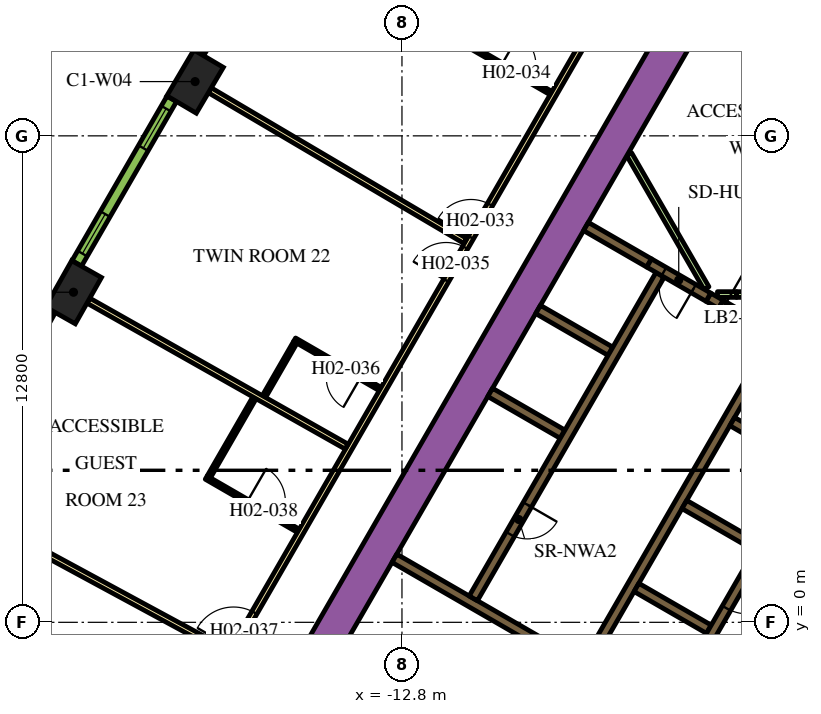
"""IFC4 building model, lengths in metres.
Left out: names, types, materials, properties, quantities, classifications, styles, units other than length and angle.
Written with IfcOpenShell. Run it as: python <this file> out.ifc"""

import sys

from ifc_helpers import new_model, si_unit, direction, frame, frame_2d, origin, origin_2d, place, context, subcontext, project, spatial, rectangle, extrude, element, fill, save


model = new_model("IFC4")
c1 = context("Model", 3, precision=1e-05, world=origin(), true_north=direction((0.0, 1.0)))
c2 = subcontext(c1, "Body", "Model", "MODEL_VIEW")
j1 = project(units=[si_unit("LENGTHUNIT", "METRE"), si_unit("PLANEANGLEUNIT", "RADIAN")], contexts=[c1])
p1 = place(None, origin())
s1 = spatial("IfcSite", under=j1, at=p1, CompositionType="ELEMENT")
p2 = place(p1, origin())
s2 = spatial("IfcBuilding", under=s1, at=p2, CompositionType="ELEMENT")
p3 = place(p2, frame((0.0, 0.0, 43.2)))
s3 = spatial("IfcBuildingStorey", under=s2, at=p3, CompositionType="ELEMENT", Elevation=43.2)
for number, where, z_axis, x_axis in (
    (1, (-18.243, 14.228, 0.0), (0.0, 0.0, 1.0), (-0.508, -0.861, 0.0)),
    (2, (-21.443, 8.685, 0.0), (0.0, 0.0, 1.0), (-0.492, -0.871, 0.0)),
):
    element("IfcColumn", number, at=place(p3, frame(where, z_axis=z_axis, x_axis=x_axis)), inside=s3, PredefinedType="COLUMN", context=c2, shape_type="SweptSolid", body=[
        extrude(rectangle(XDim=1.4, YDim=0.9, at=origin_2d()), origin(), (0.0, 0.0, 1.0), 3.9),
    ])
p4 = place(p3, frame((-15.36, -1.503, 0.0), z_axis=(0.0, 0.0, 1.0), x_axis=(0.50000389221, 0.866023156604, 0.0)))
e3 = element("IfcWall", 3, at=p4, inside=s3, PredefinedType="SOLIDWALL", context=c2, shape_type="SweptSolid", body=[
    extrude(rectangle(XDim=21.0, YDim=0.9, at=frame_2d((10.5, 0.0))), origin(), (0.0, 0.0, 1.0), 3.9),
])
p5 = place(p3, frame((-8.06, -1.311, 0.0), z_axis=(0.0, 0.0, 1.0), x_axis=(0.50000273126, 0.866023826885, 0.0)))
e4 = element("IfcWall", 4, at=p5, inside=s3, PredefinedType="SOLIDWALL", context=c2, shape_type="SweptSolid", body=[
    extrude(rectangle(XDim=10.33, YDim=0.25, at=frame_2d((5.165, 0.0))), origin(), (0.0, 0.0, 1.0), 3.9),
])
for number, where, z_axis, x_axis in (
    (5, (-2.204, 4.182, 0.0), (0.0, 0.0, 1.0), (-0.866, 0.5, 0.0)),
    (6, (-5.369, 3.1, 0.0), (0.0, 0.0, 1.0), (0.866, -0.5, 0.0)),
    (7, (-4.724, -0.182, 0.0), (0.0, 0.0, 1.0), (-0.866, 0.5, 0.0)),
):
    element("IfcWall", number, at=place(p3, frame(where, z_axis=z_axis, x_axis=x_axis)), inside=s3, PredefinedType="SOLIDWALL", context=c2, shape_type="SweptSolid", body=[
        extrude(rectangle(XDim=2.2, YDim=0.25, at=frame_2d((1.1, 0.0))), origin(), (0.0, 0.0, 1.0), 3.9),
    ])
p6 = place(p3, frame((-8.106, -1.14, 0.0), z_axis=(0.0, 0.0, 1.0), x_axis=(-0.866000643155, 0.500042884217, 0.0)))
e8 = element("IfcWall", 8, at=p6, inside=s3, PredefinedType="SOLIDWALL", context=c2, shape_type="SweptSolid", body=[
    extrude(rectangle(XDim=5.65, YDim=0.25, at=frame_2d((2.825, 0.0))), origin(), (0.0, 0.0, 1.0), 3.9),
])
for number, where, z_axis, x_axis in (
    (9, (-8.574, 4.95, 0.0), (0.0, 0.0, 1.0), (-0.866, 0.5, 0.0)),
    (10, (-7.314, 7.132, 0.0), (0.0, 0.0, 1.0), (-0.866, 0.5, 0.0)),
):
    element("IfcWall", number, at=place(p3, frame(where, z_axis=z_axis, x_axis=x_axis)), inside=s3, PredefinedType="SOLIDWALL", context=c2, shape_type="SweptSolid", body=[
        extrude(rectangle(XDim=2.2, YDim=0.25, at=frame_2d((1.1, 0.0))), origin(), (0.0, 0.0, 1.0), 3.9),
    ])
p7 = place(p3, frame((-6.296, 9.455, 0.0), z_axis=(0.0, 0.0, 1.0), x_axis=(-0.866011930837, 0.500023335103, 0.0)))
e11 = element("IfcWall", 11, at=p7, inside=s3, PredefinedType="SOLIDWALL", context=c2, shape_type="SweptSolid", body=[
    extrude(rectangle(XDim=1.92, YDim=0.25, at=frame_2d((0.96, 0.0))), origin(), (0.0, 0.0, 1.0), 3.9),
])
p8 = place(p3, frame((-4.409, 8.365, 0.0), z_axis=(0.0, 0.0, 1.0), x_axis=(-0.866057014183, 0.499945245186, 0.0)))
e12 = element("IfcWall", 12, at=p8, inside=s3, PredefinedType="SOLIDWALL", context=c2, shape_type="SweptSolid", body=[
    extrude(rectangle(XDim=0.379, YDim=0.25, at=frame_2d((0.19, 0.0))), origin(), (0.0, 0.0, 1.0), 3.9),
])
p9 = place(p3, frame((-6.823, 12.318, 0.0), z_axis=(0.0, 0.0, 1.0), x_axis=(0.500007885066, -0.866020851292, 0.0)))
e13 = element("IfcWall", 13, at=p9, inside=s3, PredefinedType="PARTITIONING", context=c2, shape_type="SweptSolid", body=[
    extrude(rectangle(XDim=4.072, YDim=0.15, at=frame_2d((2.036, 0.0))), origin(), (0.0, 0.0, 1.0), 2.75),
])
p10 = place(p3, frame((-4.498, 8.625, 0.0), z_axis=(0.0, 0.0, 1.0), x_axis=(1.0, 0.0, 0.0)))
e14 = element("IfcWall", 14, at=p10, inside=s3, PredefinedType="PARTITIONING", context=c2, shape_type="SweptSolid", body=[
    extrude(rectangle(XDim=0.502, YDim=0.15, at=frame_2d((0.251, 0.0))), origin(), (0.0, 0.0, 1.0), 2.75),
])
p11 = place(p3, frame((-6.008, 9.144, 0.0), z_axis=(0.0, 0.0, 1.0), x_axis=(-0.500006956611, -0.866021387346, 0.0)))
e15 = element("IfcWall", 15, at=p11, inside=s3, PredefinedType="SOLIDWALL", context=c2, shape_type="SweptSolid", body=[
    extrude(rectangle(XDim=9.83, YDim=0.25, at=frame_2d((4.915, 0.0))), origin(), (0.0, 0.0, 1.0), 3.9),
])
p12 = place(p11, frame((6.985, 0.0, 0.0)))
e16 = element("IfcOpeningElement", 16, at=p12, cuts=e15, PredefinedType="OPENING", context=c2, shape_type="SweptSolid", body=[
    extrude(rectangle(XDim=0.9, YDim=2.1, at=frame_2d((0.45, 1.05))), frame((0.0, 0.135, 0.0), z_axis=(0.0, -1.0, 0.0), x_axis=(1.0, 0.0, 0.0)), (0.0, 0.0, 1.0), 0.27),
])
p13 = place(p3, frame((-0.898, 6.194, 0.0), z_axis=(0.0, 0.0, 1.0), x_axis=(-0.499996202215, -0.866027596426, 0.0)))
e17 = element("IfcWall", 17, at=p13, inside=s3, PredefinedType="SOLIDWALL", context=c2, shape_type="SweptSolid", body=[
    extrude(rectangle(XDim=9.83, YDim=0.25, at=frame_2d((4.915, 0.0))), origin(), (0.0, 0.0, 1.0), 3.9),
])
p14 = place(p13, frame((0.585, 0.0, 0.0)))
e18 = element("IfcOpeningElement", 18, at=p14, cuts=e17, PredefinedType="OPENING", context=c2, shape_type="SweptSolid", body=[
    extrude(rectangle(XDim=1.1, YDim=2.1, at=frame_2d((0.55, 1.05))), frame((0.0, 0.135, 0.0), z_axis=(0.0, -1.0, 0.0), x_axis=(1.0, 0.0, 0.0)), (0.0, 0.0, 1.0), 0.27),
])
p15 = place(p13, frame((3.105, 0.0, 0.0)))
e19 = element("IfcOpeningElement", 19, at=p15, cuts=e17, PredefinedType="OPENING", context=c2, shape_type="SweptSolid", body=[
    extrude(rectangle(XDim=1.1, YDim=2.1, at=frame_2d((0.55, 1.05))), frame((0.0, 0.135, 0.0), z_axis=(0.0, -1.0, 0.0), x_axis=(1.0, 0.0, 0.0)), (0.0, 0.0, 1.0), 0.27),
])
p16 = place(p13, frame((5.625, 0.0, 0.0)))
e20 = element("IfcOpeningElement", 20, at=p16, cuts=e17, PredefinedType="OPENING", context=c2, shape_type="SweptSolid", body=[
    extrude(rectangle(XDim=1.1, YDim=2.1, at=frame_2d((0.55, 1.05))), frame((0.0, 0.135, 0.0), z_axis=(0.0, -1.0, 0.0), x_axis=(1.0, 0.0, 0.0)), (0.0, 0.0, 1.0), 0.27),
])
p17 = place(p13, frame((8.145, 0.0, 0.0)))
e21 = element("IfcOpeningElement", 21, at=p17, cuts=e17, PredefinedType="OPENING", context=c2, shape_type="SweptSolid", body=[
    extrude(rectangle(XDim=1.1, YDim=2.1, at=frame_2d((0.55, 1.05))), frame((0.0, 0.135, 0.0), z_axis=(0.0, -1.0, 0.0), x_axis=(1.0, 0.0, 0.0)), (0.0, 0.0, 1.0), 0.27),
])
p18 = place(p3, frame((-2.195, 8.625, 0.0), z_axis=(0.0, 0.0, 1.0), x_axis=(-1.0, 0.0, 0.0)))
e22 = element("IfcWall", 22, at=p18, inside=s3, PredefinedType="PARTITIONING", context=c2, shape_type="SweptSolid", body=[
    extrude(rectangle(XDim=1.8, YDim=0.15, at=frame_2d((0.9, 0.0))), origin(), (0.0, 0.0, 1.0), 2.75),
])
p19 = place(p18, frame((0.45, 0.0, 0.0)))
e23 = element("IfcOpeningElement", 23, at=p19, cuts=e22, PredefinedType="OPENING", context=c2, shape_type="SweptSolid", body=[
    extrude(rectangle(XDim=0.9, YDim=2.1, at=frame_2d((0.45, 1.05))), frame((0.0, 0.085, 0.0), z_axis=(0.0, -1.0, 0.0), x_axis=(1.0, 0.0, 0.0)), (0.0, 0.0, 1.0), 0.17),
])
p20 = place(p3, frame((-4.409, 8.365, 0.0), z_axis=(0.0, 0.0, 1.0), x_axis=(0.866034573852, -0.49998411664, 0.0)))
e24 = element("IfcWall", 24, at=p20, inside=s3, PredefinedType="SOLIDWALL", context=c2, shape_type="SweptSolid", body=[
    extrude(rectangle(XDim=1.4, YDim=0.25, at=frame_2d((0.7, 0.0))), origin(), (0.0, 0.0, 1.0), 3.9),
])
p21 = place(p20, frame((0.1, 0.0, 0.0)))
e25 = element("IfcOpeningElement", 25, at=p21, cuts=e24, PredefinedType="OPENING", context=c2, shape_type="SweptSolid", body=[
    extrude(rectangle(XDim=1.2, YDim=2.1, at=frame_2d((0.6, 1.05))), frame((0.0, 0.135, 0.0), z_axis=(0.0, -1.0, 0.0), x_axis=(1.0, 0.0, 0.0)), (0.0, 0.0, 1.0), 0.27),
])
p22 = place(p3, frame((-4.737, 8.555, 0.0), z_axis=(0.0, 0.0, 1.0), x_axis=(-0.865989075817, 0.500062916607, 0.0)))
e26 = element("IfcWall", 26, at=p22, inside=s3, PredefinedType="SOLIDWALL", context=c2, shape_type="SweptSolid", body=[
    extrude(rectangle(XDim=1.8, YDim=0.25, at=frame_2d((0.9, 0.0))), origin(), (0.0, 0.0, 1.0), 3.9),
])
p23 = place(p22, frame((0.45, 0.0, 0.0)))
e27 = element("IfcOpeningElement", 27, at=p23, cuts=e26, PredefinedType="OPENING", context=c2, shape_type="SweptSolid", body=[
    extrude(rectangle(XDim=0.9, YDim=2.1, at=frame_2d((0.45, 1.05))), frame((0.0, 0.135, 0.0), z_axis=(0.0, -1.0, 0.0), x_axis=(1.0, 0.0, 0.0)), (0.0, 0.0, 1.0), 0.27),
])
p24 = place(p3, frame((-19.081, -3.9, 0.0), z_axis=(0.0, 0.0, 1.0), x_axis=(0.499998313975, 0.866026377209, 0.0)))
e28 = element("IfcWall", 28, at=p24, inside=s3, PredefinedType="PARTITIONING", context=c2, shape_type="SweptSolid", body=[
    extrude(rectangle(XDim=25.766, YDim=0.15, at=frame_2d((12.883, 0.0))), origin(), (0.0, 0.0, 1.0), 2.75),
])
p25 = place(p24, frame((16.196, 0.0, 0.0)))
e29 = element("IfcOpeningElement", 29, at=p25, cuts=e28, PredefinedType="OPENING", context=c2, shape_type="SweptSolid", body=[
    extrude(rectangle(XDim=1.0, YDim=2.1, at=frame_2d((0.5, 1.05))), frame((0.0, 0.085, 0.0), z_axis=(0.0, -1.0, 0.0), x_axis=(1.0, 0.0, 0.0)), (0.0, 0.0, 1.0), 0.17),
])
p26 = place(p24, frame((14.889, 0.0, 0.0)))
e30 = element("IfcOpeningElement", 30, at=p26, cuts=e28, PredefinedType="OPENING", context=c2, shape_type="SweptSolid", body=[
    extrude(rectangle(XDim=1.0, YDim=2.1, at=frame_2d((0.5, 1.05))), frame((0.0, 0.085, 0.0), z_axis=(0.0, -1.0, 0.0), x_axis=(1.0, 0.0, 0.0)), (0.0, 0.0, 1.0), 0.17),
])
p27 = place(p24, frame((3.698, 0.0, 0.0)))
e31 = element("IfcOpeningElement", 31, at=p27, cuts=e28, PredefinedType="OPENING", context=c2, shape_type="SweptSolid", body=[
    extrude(rectangle(XDim=1.1, YDim=2.1, at=frame_2d((0.55, 1.05))), frame((0.0, 0.085, 0.0), z_axis=(0.0, -1.0, 0.0), x_axis=(1.0, 0.0, 0.0)), (0.0, 0.0, 1.0), 0.17),
])
p28 = place(p24, frame((2.392, 0.0, 0.0)))
e32 = element("IfcOpeningElement", 32, at=p28, cuts=e28, PredefinedType="OPENING", context=c2, shape_type="SweptSolid", body=[
    extrude(rectangle(XDim=1.0, YDim=2.1, at=frame_2d((0.5, 1.05))), frame((0.0, 0.085, 0.0), z_axis=(0.0, -1.0, 0.0), x_axis=(1.0, 0.0, 0.0)), (0.0, 0.0, 1.0), 0.17),
])
p29 = place(p3, frame((-24.145, 2.871, 0.0), z_axis=(0.0, 0.0, 1.0), x_axis=(0.879551725039, -0.475803281809, 0.0)))
e33 = element("IfcWall", 33, at=p29, inside=s3, PredefinedType="PARTITIONING", context=c2, shape_type="SweptSolid", body=[
    extrude(rectangle(XDim=7.688, YDim=0.15, at=frame_2d((3.844, 0.0))), origin(), (0.0, 0.0, 1.0), 2.75),
])
p30 = place(p3, frame((-21.052, 8.464, 0.0), z_axis=(0.0, 0.0, 1.0), x_axis=(0.87059371954, -0.492002617368, 0.0)))
e34 = element("IfcWall", 34, at=p30, inside=s3, PredefinedType="PARTITIONING", context=c2, shape_type="SweptSolid", body=[
    extrude(rectangle(XDim=7.803, YDim=0.15, at=frame_2d((3.902, 0.0))), origin(), (0.0, 0.0, 1.0), 2.75),
])
p31 = place(p3, frame((-17.856, 13.999, 0.0), z_axis=(0.0, 0.0, 1.0), x_axis=(0.861371519381, -0.507975497047, 0.0)))
e35 = element("IfcWall", 35, at=p31, inside=s3, PredefinedType="PARTITIONING", context=c2, shape_type="SweptSolid", body=[
    extrude(rectangle(XDim=7.804, YDim=0.15, at=frame_2d((3.902, 0.0))), origin(), (0.0, 0.0, 1.0), 2.75),
])
p32 = place(p3, frame((-11.129, 15.224, 0.0), z_axis=(0.0, 0.0, 1.0), x_axis=(0.866021400173, -0.500006934395, 0.0)))
e36 = element("IfcWall", 36, at=p32, inside=s3, PredefinedType="PARTITIONING", context=c2, shape_type="SweptSolid", body=[
    extrude(rectangle(XDim=2.6, YDim=0.1, at=frame_2d((1.3, 0.0))), origin(), (0.0, 0.0, 1.0), 2.75),
])
p33 = place(p32, frame((1.1, 0.0, 0.0)))
e37 = element("IfcOpeningElement", 37, at=p33, cuts=e36, PredefinedType="OPENING", context=c2, shape_type="SweptSolid", body=[
    extrude(rectangle(XDim=0.9, YDim=2.1, at=frame_2d((0.45, 1.05))), frame((0.0, 0.06, 0.0), z_axis=(0.0, -1.0, 0.0), x_axis=(1.0, 0.0, 0.0)), (0.0, 0.0, 1.0), 0.12),
])
p34 = place(p3, frame((-13.373, 6.138, 0.0), z_axis=(0.0, 0.0, 1.0), x_axis=(-0.866062058628, 0.499936506574, 0.0)))
e38 = element("IfcWall", 38, at=p34, inside=s3, PredefinedType="PARTITIONING", context=c2, shape_type="SweptSolid", body=[
    extrude(rectangle(XDim=2.6, YDim=0.1, at=frame_2d((1.3, 0.0))), origin(), (0.0, 0.0, 1.0), 2.75),
])
p35 = place(p34, frame((0.6, 0.0, 0.0)))
e39 = element("IfcOpeningElement", 39, at=p35, cuts=e38, PredefinedType="OPENING", context=c2, shape_type="SweptSolid", body=[
    extrude(rectangle(XDim=0.9, YDim=2.1, at=frame_2d((0.45, 1.05))), frame((0.0, 0.06, 0.0), z_axis=(0.0, -1.0, 0.0), x_axis=(1.0, 0.0, 0.0)), (0.0, 0.0, 1.0), 0.12),
])
p36 = place(p3, frame((-15.606, 7.37, 0.0), z_axis=(0.0, 0.0, 1.0), x_axis=(-0.499974350878, -0.866040211805, 0.0)))
e40 = element("IfcWall", 40, at=p36, inside=s3, PredefinedType="PARTITIONING", context=c2, shape_type="SweptSolid", body=[
    extrude(rectangle(XDim=1.65, YDim=0.1, at=frame_2d((0.825, 0.0))), origin(), (0.0, 0.0, 1.0), 2.75),
])
p37 = place(p3, frame((-17.951, 3.808, 0.0), z_axis=(0.0, 0.0, 1.0), x_axis=(0.866034573852, -0.49998411664, 0.0)))
e41 = element("IfcWall", 41, at=p37, inside=s3, PredefinedType="PARTITIONING", context=c2, shape_type="SweptSolid", body=[
    extrude(rectangle(XDim=2.8, YDim=0.1, at=frame_2d((1.4, 0.0))), origin(), (0.0, 0.0, 1.0), 2.75),
])
p38 = place(p37, frame((1.25, 0.0, 0.0)))
e42 = element("IfcOpeningElement", 42, at=p38, cuts=e41, PredefinedType="OPENING", context=c2, shape_type="SweptSolid", body=[
    extrude(rectangle(XDim=1.0, YDim=2.1, at=frame_2d((0.5, 1.05))), frame((0.0, 0.06, 0.0), z_axis=(0.0, -1.0, 0.0), x_axis=(1.0, 0.0, 0.0)), (0.0, 0.0, 1.0), 0.12),
])
p39 = place(p3, frame((-17.878, 3.835, 0.0), z_axis=(0.0, 0.0, 1.0), x_axis=(0.500061428766, 0.865989934965, 0.0)))
e43 = element("IfcWall", 43, at=p39, inside=s3, PredefinedType="PARTITIONING", context=c2, shape_type="SweptSolid", body=[
    extrude(rectangle(XDim=2.39, YDim=0.1, at=frame_2d((1.195, 0.0))), origin(), (0.0, 0.0, 1.0), 2.75),
])
p40 = place(p3, frame((-15.564, 19.267, 0.0), z_axis=(0.0, 0.0, 1.0), x_axis=(-0.515938796285, -0.856625448191, 0.0)))
e44 = element("IfcWall", 44, at=p40, inside=s3, PredefinedType="SOLIDWALL", context=c2, shape_type="SweptSolid", body=[
    extrude(rectangle(XDim=4.998, YDim=0.29, at=frame_2d((2.499, 0.0))), origin(), (0.0, 0.0, 1.0), 3.65),
])
p41 = place(p40, frame((0.297, 0.0, 0.9)))
e45 = element("IfcOpeningElement", 45, at=p41, cuts=e44, PredefinedType="OPENING", context=c2, shape_type="SweptSolid", body=[
    extrude(rectangle(XDim=1.2, YDim=2.15, at=frame_2d((0.6, 1.075))), frame((0.0, 0.155, 0.0), z_axis=(0.0, -1.0, 0.0), x_axis=(1.0, 0.0, 0.0)), (0.0, 0.0, 1.0), 0.31),
])
p42 = place(p40, frame((3.501, 0.0, 0.9)))
e46 = element("IfcOpeningElement", 46, at=p42, cuts=e44, PredefinedType="OPENING", context=c2, shape_type="SweptSolid", body=[
    extrude(rectangle(XDim=1.2, YDim=2.15, at=frame_2d((0.6, 1.075))), frame((0.0, 0.155, 0.0), z_axis=(0.0, -1.0, 0.0), x_axis=(1.0, 0.0, 0.0)), (0.0, 0.0, 1.0), 0.31),
])
p43 = place(p3, frame((-18.858, 13.773, 0.0), z_axis=(0.0, 0.0, 1.0), x_axis=(-0.50002123722, -0.866013142123, 0.0)))
e47 = element("IfcWall", 47, at=p43, inside=s3, PredefinedType="SOLIDWALL", context=c2, shape_type="SweptSolid", body=[
    extrude(rectangle(XDim=4.998, YDim=0.29, at=frame_2d((2.499, 0.0))), origin(), (0.0, 0.0, 1.0), 3.65),
])
p44 = place(p43, frame((0.297, 0.0, 0.9)))
e48 = element("IfcOpeningElement", 48, at=p44, cuts=e47, PredefinedType="OPENING", context=c2, shape_type="SweptSolid", body=[
    extrude(rectangle(XDim=1.2, YDim=2.15, at=frame_2d((0.6, 1.075))), frame((0.0, 0.155, 0.0), z_axis=(0.0, -1.0, 0.0), x_axis=(1.0, 0.0, 0.0)), (0.0, 0.0, 1.0), 0.31),
])
p45 = place(p43, frame((3.501, 0.0, 0.9)))
e49 = element("IfcOpeningElement", 49, at=p45, cuts=e47, PredefinedType="OPENING", context=c2, shape_type="SweptSolid", body=[
    extrude(rectangle(XDim=1.2, YDim=2.15, at=frame_2d((0.6, 1.075))), frame((0.0, 0.155, 0.0), z_axis=(0.0, -1.0, 0.0), x_axis=(1.0, 0.0, 0.0)), (0.0, 0.0, 1.0), 0.31),
])
p46 = place(p3, frame((-22.05, 8.22, 0.0), z_axis=(0.0, 0.0, 1.0), x_axis=(-0.483912572871, -0.875116347589, 0.0)))
e50 = element("IfcWall", 50, at=p46, inside=s3, PredefinedType="SOLIDWALL", context=c2, shape_type="SweptSolid", body=[
    extrude(rectangle(XDim=4.998, YDim=0.29, at=frame_2d((2.499, 0.0))), origin(), (0.0, 0.0, 1.0), 3.65),
])
p47 = place(p46, frame((0.297, 0.0, 0.9)))
e51 = element("IfcOpeningElement", 51, at=p47, cuts=e50, PredefinedType="OPENING", context=c2, shape_type="SweptSolid", body=[
    extrude(rectangle(XDim=1.2, YDim=2.15, at=frame_2d((0.6, 1.075))), frame((0.0, 0.155, 0.0), z_axis=(0.0, -1.0, 0.0), x_axis=(1.0, 0.0, 0.0)), (0.0, 0.0, 1.0), 0.31),
])
p48 = place(p46, frame((3.501, 0.0, 0.9)))
e52 = element("IfcOpeningElement", 52, at=p48, cuts=e50, PredefinedType="OPENING", context=c2, shape_type="SweptSolid", body=[
    extrude(rectangle(XDim=1.2, YDim=2.15, at=frame_2d((0.6, 1.075))), frame((0.0, 0.155, 0.0), z_axis=(0.0, -1.0, 0.0), x_axis=(1.0, 0.0, 0.0)), (0.0, 0.0, 1.0), 0.31),
])
p49 = place(p12, origin())
e53 = element("IfcDoor", 53, at=p49, inside=s3, OperationType="SINGLE_SWING_LEFT", PredefinedType="DOOR", context=c2, shape_type="SweptSolid", body=[
    extrude(rectangle(XDim=0.9, YDim=2.1, at=frame_2d((0.45, 1.05))), frame((0.0, 0.025, 0.0), z_axis=(0.0, -1.0, 0.0), x_axis=(1.0, 0.0, 0.0)), (0.0, 0.0, 1.0), 0.05),
])
fill(e16, e53)
p50 = place(p16, origin())
e54 = element("IfcDoor", 54, at=p50, inside=s3, OperationType="DOUBLE_DOOR_SLIDING", PredefinedType="DOOR", context=c2, shape_type="SweptSolid", body=[
    extrude(rectangle(XDim=1.1, YDim=2.1, at=frame_2d((0.55, 1.05))), frame((0.0, 0.025, 0.0), z_axis=(0.0, -1.0, 0.0), x_axis=(1.0, 0.0, 0.0)), (0.0, 0.0, 1.0), 0.05),
])
fill(e20, e54)
p51 = place(p21, origin())
e55 = element("IfcDoor", 55, at=p51, inside=s3, OperationType="SINGLE_SWING_LEFT", PredefinedType="DOOR", context=c2, shape_type="SweptSolid", body=[
    extrude(rectangle(XDim=1.2, YDim=2.1, at=frame_2d((0.6, 1.05))), frame((0.0, 0.025, 0.0), z_axis=(0.0, -1.0, 0.0), x_axis=(1.0, 0.0, 0.0)), (0.0, 0.0, 1.0), 0.05),
])
fill(e25, e55)
p52 = place(p23, origin())
e56 = element("IfcDoor", 56, at=p52, inside=s3, OperationType="SINGLE_SWING_LEFT", PredefinedType="DOOR", context=c2, shape_type="SweptSolid", body=[
    extrude(rectangle(XDim=0.9, YDim=2.1, at=frame_2d((0.45, 1.05))), frame((0.0, 0.025, 0.0), z_axis=(0.0, -1.0, 0.0), x_axis=(1.0, 0.0, 0.0)), (0.0, 0.0, 1.0), 0.05),
])
fill(e27, e56)
p53 = place(p25, origin())
e57 = element("IfcDoor", 57, at=p53, inside=s3, OperationType="SINGLE_SWING_LEFT", PredefinedType="DOOR", context=c2, shape_type="SweptSolid", body=[
    extrude(rectangle(XDim=1.0, YDim=2.1, at=frame_2d((0.5, 1.05))), frame((0.0, 0.025, 0.0), z_axis=(0.0, -1.0, 0.0), x_axis=(1.0, 0.0, 0.0)), (0.0, 0.0, 1.0), 0.05),
])
fill(e29, e57)
p54 = place(p33, origin())
e58 = element("IfcDoor", 58, at=p54, inside=s3, OperationType="SINGLE_SWING_RIGHT", PredefinedType="DOOR", context=c2, shape_type="SweptSolid", body=[
    extrude(rectangle(XDim=0.9, YDim=2.1, at=frame_2d((0.45, 1.05))), frame((0.0, 0.025, 0.0), z_axis=(0.0, -1.0, 0.0), x_axis=(1.0, 0.0, 0.0)), (0.0, 0.0, 1.0), 0.05),
])
fill(e37, e58)
p55 = place(p26, origin())
e59 = element("IfcDoor", 59, at=p55, inside=s3, OperationType="SINGLE_SWING_RIGHT", PredefinedType="DOOR", context=c2, shape_type="SweptSolid", body=[
    extrude(rectangle(XDim=1.0, YDim=2.1, at=frame_2d((0.5, 1.05))), frame((0.0, 0.025, 0.0), z_axis=(0.0, -1.0, 0.0), x_axis=(1.0, 0.0, 0.0)), (0.0, 0.0, 1.0), 0.05),
])
fill(e30, e59)
p56 = place(p35, origin())
e60 = element("IfcDoor", 60, at=p56, inside=s3, OperationType="SINGLE_SWING_LEFT", PredefinedType="DOOR", context=c2, shape_type="SweptSolid", body=[
    extrude(rectangle(XDim=0.9, YDim=2.1, at=frame_2d((0.45, 1.05))), frame((0.0, 0.025, 0.0), z_axis=(0.0, -1.0, 0.0), x_axis=(1.0, 0.0, 0.0)), (0.0, 0.0, 1.0), 0.05),
])
fill(e39, e60)
p57 = place(p27, origin())
e61 = element("IfcDoor", 61, at=p57, inside=s3, OperationType="SINGLE_SWING_LEFT", PredefinedType="DOOR", context=c2, shape_type="SweptSolid", body=[
    extrude(rectangle(XDim=1.1, YDim=2.1, at=frame_2d((0.55, 1.05))), frame((0.0, 0.025, 0.0), z_axis=(0.0, -1.0, 0.0), x_axis=(1.0, 0.0, 0.0)), (0.0, 0.0, 1.0), 0.05),
])
fill(e31, e61)
p58 = place(p38, origin())
e62 = element("IfcDoor", 62, at=p58, inside=s3, OperationType="SINGLE_SWING_LEFT", PredefinedType="DOOR", context=c2, shape_type="SweptSolid", body=[
    extrude(rectangle(XDim=1.0, YDim=2.1, at=frame_2d((0.5, 1.05))), frame((0.0, 0.025, 0.0), z_axis=(0.0, -1.0, 0.0), x_axis=(1.0, 0.0, 0.0)), (0.0, 0.0, 1.0), 0.05),
])
fill(e42, e62)
p59 = place(p44, origin())
e63 = element("IfcWindow", 63, at=p59, inside=s3, PartitioningType="DOUBLE_PANEL_VERTICAL", PredefinedType="WINDOW", context=c2, shape_type="SweptSolid", body=[
    extrude(rectangle(XDim=1.2, YDim=2.15, at=frame_2d((0.6, 1.075))), frame((0.0, 0.015, 0.0), z_axis=(0.0, -1.0, 0.0), x_axis=(1.0, 0.0, 0.0)), (0.0, 0.0, 1.0), 0.06),
])
fill(e48, e63)
p60 = place(p45, origin())
e64 = element("IfcWindow", 64, at=p60, inside=s3, PartitioningType="DOUBLE_PANEL_VERTICAL", PredefinedType="WINDOW", context=c2, shape_type="SweptSolid", body=[
    extrude(rectangle(XDim=1.2, YDim=2.15, at=frame_2d((0.6, 1.075))), frame((0.0, 0.015, 0.0), z_axis=(0.0, -1.0, 0.0), x_axis=(1.0, 0.0, 0.0)), (0.0, 0.0, 1.0), 0.06),
])
fill(e49, e64)
save(model, sys.argv[1])
